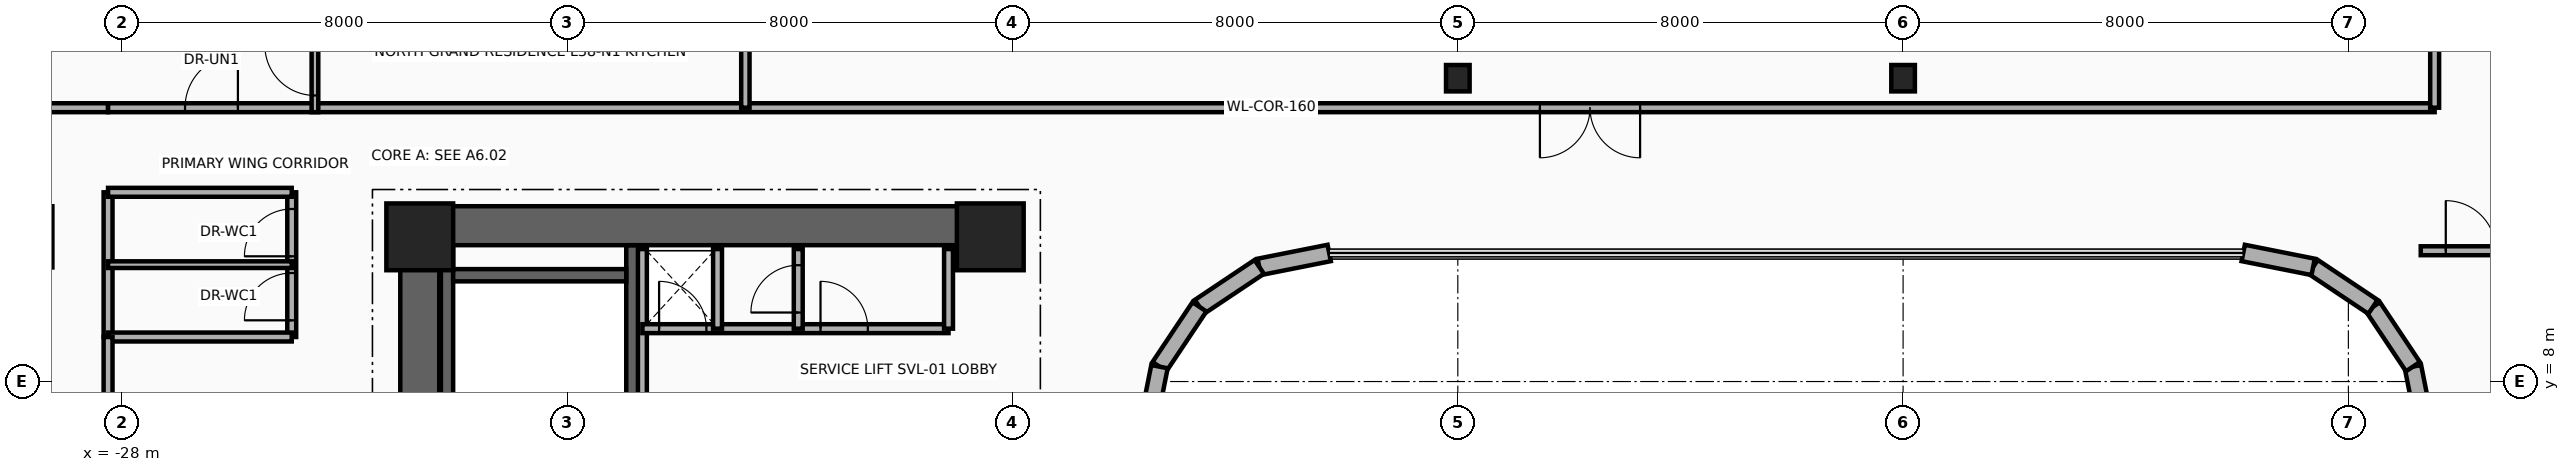
"""IFC4 building model, lengths in metres.
Left out: names, types, materials, properties, quantities, classifications, styles, units other than length and angle.
Written with IfcOpenShell. Run it as: python <this file> out.ifc"""

import sys

from ifc_helpers import new_model, si_unit, direction, frame, frame_2d, origin, origin_2d, place, context, subcontext, project, spatial, rectangle, i_section, extrude, source, transform, mapped, element, fill, save


model = new_model("IFC4")
c1 = context("Model", 3, precision=1e-05, world=origin(), true_north=direction((0.0, 1.0)))
c2 = subcontext(c1, "Body", "Model", "MODEL_VIEW")
j1 = project(units=[si_unit("LENGTHUNIT", "METRE"), si_unit("PLANEANGLEUNIT", "RADIAN")], contexts=[c1])
p1 = place(None, origin())
s1 = spatial("IfcSite", under=j1, at=p1, CompositionType="ELEMENT")
p2 = place(p1, origin())
s2 = spatial("IfcBuilding", under=s1, at=p2, CompositionType="ELEMENT")
p3 = place(p2, frame((0.0, 0.0, 150.1)))
s3 = spatial("IfcBuildingStorey", under=s2, at=p3, CompositionType="ELEMENT", Elevation=150.1)
for number, where, z_axis, x_axis in (
    (1, (-22.16, 1.78, 0.0), (0.0, 0.0, 1.0), (0.0, 1.0, 0.0)),
    (2, (-18.83, 1.78, 0.0), (0.0, 0.0, 1.0), (0.0, 1.0, 0.0)),
):
    element("IfcWall", number, at=place(p3, frame(where, z_axis=z_axis, x_axis=x_axis)), inside=s3, PredefinedType="SHEAR", context=c2, shape_type="SweptSolid", body=[
        extrude(rectangle(XDim=8.67, YDim=0.22, at=frame_2d((4.335, 0.0))), origin(), (0.0, 0.0, 1.0), 3.46),
    ])
p4 = place(p3, frame((-22.05, 9.91, 0.0), z_axis=(0.0, 0.0, 1.0), x_axis=(1.0, 0.0, 0.0)))
e3 = element("IfcWall", 3, at=p4, inside=s3, PredefinedType="SHEAR", context=c2, shape_type="SweptSolid", body=[
    extrude(rectangle(XDim=3.11, YDim=0.22, at=frame_2d((1.555, 0.0))), origin(), (0.0, 0.0, 1.0), 3.46),
])
p5 = place(p3, frame((-22.65, -11.15, 0.0), z_axis=(0.0, 0.0, 1.0), x_axis=(0.0, 1.0, 0.0)))
e4 = element("IfcWall", 4, at=p5, inside=s3, PredefinedType="SHEAR", context=c2, shape_type="SweptSolid", body=[
    extrude(rectangle(XDim=22.3, YDim=0.7, at=frame_2d((11.15, 0.0))), origin(), (0.0, 0.0, 1.0), 3.46),
])
p6 = place(p3, frame((-22.65, 10.8, 0.0), z_axis=(0.0, 0.0, 1.0), x_axis=(1.0, 0.0, 0.0)))
e5 = element("IfcWall", 5, at=p6, inside=s3, PredefinedType="SHEAR", context=c2, shape_type="SweptSolid", body=[
    extrude(rectangle(XDim=10.25, YDim=0.7, at=frame_2d((5.125, 0.0))), origin(), (0.0, 0.0, 1.0), 3.46),
])
m1 = source(origin(), c2, "Body", "SweptSolid", [
    extrude(rectangle(XDim=1.2, YDim=1.2, at=origin_2d()), origin(), (0.0, 0.0, 1.0), 3.7),
])
for number, where, z_axis, x_axis in (
    (6, (-22.65, 10.6, 0.0), (0.0, 0.0, 1.0), (1.0, 0.0, 0.0)),
    (7, (-12.4, 10.6, 0.0), (0.0, 0.0, 1.0), (1.0, 0.0, 0.0)),
):
    element("IfcColumn", number, at=place(p3, frame(where, z_axis=z_axis, x_axis=x_axis)), inside=s3, PredefinedType="COLUMN", context=c2, shape_type="MappedRepresentation", body=[
        mapped(m1, transform((0.0, 0.0, 0.0), x_axis=(1.0, 0.0, 0.0), y_axis=(0.0, 1.0, 0.0), z_axis=(0.0, 0.0, 1.0), scale=1.0)),
    ])
m2 = source(origin(), c2, "Body", "SweptSolid", [
    extrude(i_section(OverallWidth=0.424, OverallDepth=0.474, WebThickness=0.048, FlangeThickness=0.077, at=origin_2d()), origin(), (0.0, 0.0, 1.0), 3.7),
])
for number, where, z_axis, x_axis in (
    (8, (-4.0, 13.45, 0.0), (0.0, 0.0, 1.0), (1.0, 0.0, 0.0)),
    (9, (4.0, 13.45, 0.0), (0.0, 0.0, 1.0), (1.0, 0.0, 0.0)),
):
    element("IfcColumn", number, at=place(p3, frame(where, z_axis=z_axis, x_axis=x_axis)), inside=s3, PredefinedType="COLUMN", context=c2, shape_type="MappedRepresentation", body=[
        mapped(m2, transform((0.0, 0.0, 0.0), x_axis=(1.0, 0.0, 0.0), y_axis=(0.0, 1.0, 0.0), z_axis=(0.0, 0.0, 1.0), scale=1.0)),
    ])
p7 = place(p3, frame((13.41, 7.011, 0.0), z_axis=(0.0, 0.0, 1.0), x_axis=(-0.195090163074, 0.980785312019, 0.0)))
e10 = element("IfcWall", 10, at=p7, inside=s3, PredefinedType="SOLIDWALL", context=c2, shape_type="SweptSolid", body=[
    extrude(rectangle(XDim=1.281, YDim=0.3, at=frame_2d((0.641, 0.0))), origin(), (0.0, 0.0, 1.0), 3.46),
])
for number, where, z_axis, x_axis in (
    (11, (13.16, 8.268, 0.0), (0.0, 0.0, 1.0), (-0.556, 0.831, 0.0)),
    (12, (12.442, 9.342, 0.0), (0.0, 0.0, 1.0), (-0.831, 0.556, 0.0)),
):
    element("IfcWall", number, at=place(p3, frame(where, z_axis=z_axis, x_axis=x_axis)), inside=s3, PredefinedType="SOLIDWALL", context=c2, shape_type="SweptSolid", body=[
        extrude(rectangle(XDim=1.292, YDim=0.3, at=frame_2d((0.646, 0.0))), origin(), (0.0, 0.0, 1.0), 3.46),
    ])
for number, where, z_axis, x_axis in (
    (13, (11.367, 10.06, 0.0), (0.0, 0.0, 1.0), (-0.981, 0.195, 0.0)),
    (14, (-6.311, 10.31, 0.0), (0.0, 0.0, 1.0), (-0.981, -0.195, 0.0)),
):
    element("IfcWall", number, at=place(p3, frame(where, z_axis=z_axis, x_axis=x_axis)), inside=s3, PredefinedType="SOLIDWALL", context=c2, shape_type="SweptSolid", body=[
        extrude(rectangle(XDim=1.281, YDim=0.3, at=frame_2d((0.641, 0.0))), origin(), (0.0, 0.0, 1.0), 3.46),
    ])
p8 = place(p3, frame((-7.567, 10.06, 0.0), z_axis=(0.0, 0.0, 1.0), x_axis=(-0.831497739511, -0.555528135371, 0.0)))
e15 = element("IfcWall", 15, at=p8, inside=s3, PredefinedType="SOLIDWALL", context=c2, shape_type="SweptSolid", body=[
    extrude(rectangle(XDim=1.292, YDim=0.3, at=frame_2d((0.646, 0.0))), origin(), (0.0, 0.0, 1.0), 3.46),
])
p9 = place(p3, frame((-8.642, 9.342, 0.0), z_axis=(0.0, 0.0, 1.0), x_axis=(-0.555615398575, -0.831439431869, 0.0)))
e16 = element("IfcWall", 16, at=p9, inside=s3, PredefinedType="SOLIDWALL", context=c2, shape_type="SweptSolid", body=[
    extrude(rectangle(XDim=1.292, YDim=0.3, at=frame_2d((0.646, 0.0))), origin(), (0.0, 0.0, 1.0), 3.46),
])
p10 = place(p3, frame((-9.36, 8.268, 0.0), z_axis=(0.0, 0.0, 1.0), x_axis=(-0.195090163074, -0.980785312019, 0.0)))
e17 = element("IfcWall", 17, at=p10, inside=s3, PredefinedType="SOLIDWALL", context=c2, shape_type="SweptSolid", body=[
    extrude(rectangle(XDim=1.281, YDim=0.3, at=frame_2d((0.641, 0.0))), origin(), (0.0, 0.0, 1.0), 3.46),
])
p11 = place(p3, frame((-18.65, 7.45, 0.0), z_axis=(0.0, 0.0, 1.0), x_axis=(0.0, 1.0, 0.0)))
e18 = element("IfcWall", 18, at=p11, inside=s3, PredefinedType="PARTITIONING", context=c2, shape_type="SweptSolid", body=[
    extrude(rectangle(XDim=2.93, YDim=0.16, at=frame_2d((1.465, 0.0))), origin(), (0.0, 0.0, 1.0), 3.46),
])
p12 = place(p3, frame((-18.65, 8.95, 0.0), z_axis=(0.0, 0.0, 1.0), x_axis=(1.0, 0.0, 0.0)))
e19 = element("IfcWall", 19, at=p12, inside=s3, PredefinedType="PARTITIONING", context=c2, shape_type="SweptSolid", body=[
    extrude(rectangle(XDim=5.5, YDim=0.16, at=frame_2d((2.75, 0.0))), origin(), (0.0, 0.0, 1.0), 3.46),
])
p13 = place(p12, frame((0.3, 0.0, 0.0)))
e20 = element("IfcOpeningElement", 20, at=p13, cuts=e19, PredefinedType="OPENING", context=c2, shape_type="SweptSolid", body=[
    extrude(rectangle(XDim=0.85, YDim=2.05, at=frame_2d((0.425, 1.025))), frame((0.0, 0.095, 0.0), z_axis=(0.0, -1.0, 0.0), x_axis=(1.0, 0.0, 0.0)), (0.0, 0.0, 1.0), 0.19),
])
p14 = place(p12, frame((3.2, 0.0, 0.0)))
e21 = element("IfcOpeningElement", 21, at=p14, cuts=e19, PredefinedType="OPENING", context=c2, shape_type="SweptSolid", body=[
    extrude(rectangle(XDim=0.85, YDim=2.05, at=frame_2d((0.425, 1.025))), frame((0.0, 0.095, 0.0), z_axis=(0.0, -1.0, 0.0), x_axis=(1.0, 0.0, 0.0)), (0.0, 0.0, 1.0), 0.19),
])
for number, where, z_axis, x_axis in (
    (22, (-13.15, 8.95, 0.0), (0.0, 0.0, 1.0), (0.0, 1.0, 0.0)),
    (23, (-17.3, 8.95, 0.0), (0.0, 0.0, 1.0), (0.0, 1.0, 0.0)),
):
    element("IfcWall", number, at=place(p3, frame(where, z_axis=z_axis, x_axis=x_axis)), inside=s3, PredefinedType="PARTITIONING", context=c2, shape_type="SweptSolid", body=[
        extrude(rectangle(XDim=1.43, YDim=0.16, at=frame_2d((0.715, 0.0))), origin(), (0.0, 0.0, 1.0), 3.46),
    ])
p15 = place(p3, frame((-15.85, 8.95, 0.0), z_axis=(0.0, 0.0, 1.0), x_axis=(0.0, 1.0, 0.0)))
e24 = element("IfcWall", 24, at=p15, inside=s3, PredefinedType="PARTITIONING", context=c2, shape_type="SweptSolid", body=[
    extrude(rectangle(XDim=1.43, YDim=0.16, at=frame_2d((0.715, 0.0))), origin(), (0.0, 0.0, 1.0), 3.46),
])
p16 = place(p15, frame((0.29, 0.0, 0.0)))
e25 = element("IfcOpeningElement", 25, at=p16, cuts=e24, PredefinedType="OPENING", context=c2, shape_type="SweptSolid", body=[
    extrude(rectangle(XDim=0.85, YDim=2.05, at=frame_2d((0.425, 1.025))), frame((0.0, 0.095, 0.0), z_axis=(0.0, -1.0, 0.0), x_axis=(1.0, 0.0, 0.0)), (0.0, 0.0, 1.0), 0.19),
])
p17 = place(p3, frame((-28.25, 8.8, 0.0), z_axis=(0.0, 0.0, 1.0), x_axis=(0.0, 1.0, 0.0)))
e26 = element("IfcWall", 26, at=p17, inside=s3, PredefinedType="PARTITIONING", context=c2, shape_type="SweptSolid", body=[
    extrude(rectangle(XDim=2.6, YDim=0.16, at=frame_2d((1.3, 0.0))), origin(), (0.0, 0.0, 1.0), 2.666),
])
p18 = place(p3, frame((-24.95, 8.8, 0.0), z_axis=(0.0, 0.0, 1.0), x_axis=(0.0, 1.0, 0.0)))
e27 = element("IfcWall", 27, at=p18, inside=s3, PredefinedType="PARTITIONING", context=c2, shape_type="SweptSolid", body=[
    extrude(rectangle(XDim=2.6, YDim=0.16, at=frame_2d((1.3, 0.0))), origin(), (0.0, 0.0, 1.0), 2.666),
])
p19 = place(p18, frame((0.3, 0.0, 0.0)))
e28 = element("IfcOpeningElement", 28, at=p19, cuts=e27, PredefinedType="OPENING", context=c2, shape_type="SweptSolid", body=[
    extrude(rectangle(XDim=0.85, YDim=2.1, at=frame_2d((0.425, 1.05))), frame((0.0, 0.095, 0.0), z_axis=(0.0, -1.0, 0.0), x_axis=(1.0, 0.0, 0.0)), (0.0, 0.0, 1.0), 0.19),
])
p20 = place(p18, frame((1.45, 0.0, 0.0)))
e29 = element("IfcOpeningElement", 29, at=p20, cuts=e27, PredefinedType="OPENING", context=c2, shape_type="SweptSolid", body=[
    extrude(rectangle(XDim=0.85, YDim=2.1, at=frame_2d((0.425, 1.05))), frame((0.0, 0.095, 0.0), z_axis=(0.0, -1.0, 0.0), x_axis=(1.0, 0.0, 0.0)), (0.0, 0.0, 1.0), 0.19),
])
for number, where, z_axis, x_axis in (
    (30, (-28.25, 8.8, 0.0), (0.0, 0.0, 1.0), (1.0, 0.0, 0.0)),
    (31, (-28.25, 11.4, 0.0), (0.0, 0.0, 1.0), (1.0, 0.0, 0.0)),
):
    element("IfcWall", number, at=place(p3, frame(where, z_axis=z_axis, x_axis=x_axis)), inside=s3, PredefinedType="PARTITIONING", context=c2, shape_type="SweptSolid", body=[
        extrude(rectangle(XDim=3.3, YDim=0.16, at=frame_2d((1.65, 0.0))), origin(), (0.0, 0.0, 1.0), 3.46),
    ])
p21 = place(p3, frame((-28.25, 10.1, 0.0), z_axis=(0.0, 0.0, 1.0), x_axis=(1.0, 0.0, 0.0)))
e32 = element("IfcWall", 32, at=p21, inside=s3, PredefinedType="PARTITIONING", context=c2, shape_type="SweptSolid", body=[
    extrude(rectangle(XDim=3.3, YDim=0.12, at=frame_2d((1.65, 0.0))), origin(), (0.0, 0.0, 1.0), 3.46),
])
p22 = place(p3, frame((-28.25, 6.2, 0.0), z_axis=(0.0, 0.0, 1.0), x_axis=(0.0, 1.0, 0.0)))
e33 = element("IfcWall", 33, at=p22, inside=s3, PredefinedType="PARTITIONING", context=c2, shape_type="SweptSolid", body=[
    extrude(rectangle(XDim=2.6, YDim=0.16, at=frame_2d((1.3, 0.0))), origin(), (0.0, 0.0, 1.0), 2.988),
])
p23 = place(p3, frame((-32.54, 12.92, 0.0), z_axis=(0.0, 0.0, 1.0), x_axis=(1.0, 0.0, 0.0)))
e34 = element("IfcWall", 34, at=p23, inside=s3, PredefinedType="PARTITIONING", context=c2, shape_type="SweptSolid", body=[
    extrude(rectangle(XDim=4.29, YDim=0.16, at=frame_2d((2.145, 0.0))), origin(), (0.0, 0.0, 1.0), 2.896),
])
p24 = place(p3, frame((-28.25, 12.92, 0.0), z_axis=(0.0, 0.0, 1.0), x_axis=(1.0, 0.0, 0.0)))
e35 = element("IfcWall", 35, at=p24, inside=s3, PredefinedType="PARTITIONING", context=c2, shape_type="SweptSolid", body=[
    extrude(rectangle(XDim=41.8, YDim=0.16, at=frame_2d((20.9, 0.0))), origin(), (0.0, 0.0, 1.0), 2.666),
])
p25 = place(p24, frame((1.383, 0.0, 0.0)))
e36 = element("IfcOpeningElement", 36, at=p25, cuts=e35, PredefinedType="OPENING", context=c2, shape_type="SweptSolid", body=[
    extrude(rectangle(XDim=0.95, YDim=2.15, at=frame_2d((0.475, 1.075))), frame((0.0, 0.095, 0.0), z_axis=(0.0, -1.0, 0.0), x_axis=(1.0, 0.0, 0.0)), (0.0, 0.0, 1.0), 0.19),
])
p26 = place(p24, frame((25.725, 0.0, 0.0)))
e37 = element("IfcOpeningElement", 37, at=p26, cuts=e35, PredefinedType="OPENING", context=c2, shape_type="SweptSolid", body=[
    extrude(rectangle(XDim=1.8, YDim=2.15, at=frame_2d((0.9, 1.075))), frame((0.0, 0.095, 0.0), z_axis=(0.0, -1.0, 0.0), x_axis=(1.0, 0.0, 0.0)), (0.0, 0.0, 1.0), 0.19),
])
p27 = place(p3, frame((13.55, 12.92, 0.0), z_axis=(0.0, 0.0, 1.0), x_axis=(0.0, 1.0, 0.0)))
e38 = element("IfcWall", 38, at=p27, inside=s3, PredefinedType="PARTITIONING", context=c2, shape_type="SweptSolid", body=[
    extrude(rectangle(XDim=5.857, YDim=0.16, at=frame_2d((2.928, 0.0))), origin(), (0.0, 0.0, 1.0), 2.666),
])
p28 = place(p3, frame((-16.8, 12.92, 0.0), z_axis=(0.0, 0.0, 1.0), x_axis=(0.0, 1.0, 0.0)))
e39 = element("IfcWall", 39, at=p28, inside=s3, PredefinedType="PARTITIONING", context=c2, shape_type="SweptSolid", body=[
    extrude(rectangle(XDim=6.977, YDim=0.15, at=frame_2d((3.488, 0.0))), origin(), (0.0, 0.0, 1.0), 2.666),
])
p29 = place(p3, frame((-24.533, 12.84, 0.0), z_axis=(0.0, 0.0, 1.0), x_axis=(0.0, 1.0, 0.0)))
e40 = element("IfcWall", 40, at=p29, inside=s3, PredefinedType="PARTITIONING", context=c2, shape_type="SweptSolid", body=[
    extrude(rectangle(XDim=2.08, YDim=0.12, at=frame_2d((1.04, 0.0))), origin(), (0.0, 0.0, 1.0), 2.666),
])
p30 = place(p29, frame((0.3, 0.0, 0.0)))
e41 = element("IfcOpeningElement", 41, at=p30, cuts=e40, PredefinedType="OPENING", context=c2, shape_type="SweptSolid", body=[
    extrude(rectangle(XDim=0.9, YDim=2.1, at=frame_2d((0.45, 1.05))), frame((0.0, 0.075, 0.0), z_axis=(0.0, -1.0, 0.0), x_axis=(1.0, 0.0, 0.0)), (0.0, 0.0, 1.0), 0.15),
])
p31 = place(p3, frame((13.3, 10.35, 0.0), z_axis=(0.0, 0.0, 1.0), x_axis=(1.0, 0.0, 0.0)))
e42 = element("IfcWall", 42, at=p31, inside=s3, PredefinedType="PARTITIONING", context=c2, shape_type="SweptSolid", body=[
    extrude(rectangle(XDim=2.1, YDim=0.16, at=frame_2d((1.05, 0.0))), origin(), (0.0, 0.0, 1.0), 2.666),
])
p32 = place(p31, frame((0.45, 0.0, 0.0)))
e43 = element("IfcOpeningElement", 43, at=p32, cuts=e42, PredefinedType="OPENING", context=c2, shape_type="SweptSolid", body=[
    extrude(rectangle(XDim=0.9, YDim=2.1, at=frame_2d((0.45, 1.05))), frame((0.0, 0.095, 0.0), z_axis=(0.0, -1.0, 0.0), x_axis=(1.0, 0.0, 0.0)), (0.0, 0.0, 1.0), 0.19),
])
p33 = place(p13, origin())
e44 = element("IfcDoor", 44, at=p33, inside=s3, OperationType="SINGLE_SWING_LEFT", PredefinedType="DOOR", context=c2, shape_type="SweptSolid", body=[
    extrude(rectangle(XDim=0.85, YDim=2.05, at=frame_2d((0.425, 1.025))), frame((0.0, 0.025, 0.0), z_axis=(0.0, -1.0, 0.0), x_axis=(1.0, 0.0, 0.0)), (0.0, 0.0, 1.0), 0.05),
])
fill(e20, e44)
p34 = place(p14, origin())
e45 = element("IfcDoor", 45, at=p34, inside=s3, OperationType="SINGLE_SWING_RIGHT", PredefinedType="DOOR", context=c2, shape_type="SweptSolid", body=[
    extrude(rectangle(XDim=0.85, YDim=2.05, at=frame_2d((0.425, 1.025))), frame((0.0, 0.025, 0.0), z_axis=(0.0, -1.0, 0.0), x_axis=(1.0, 0.0, 0.0)), (0.0, 0.0, 1.0), 0.05),
])
fill(e21, e45)
p35 = place(p16, origin())
e46 = element("IfcDoor", 46, at=p35, inside=s3, OperationType="SINGLE_SWING_LEFT", PredefinedType="DOOR", context=c2, shape_type="SweptSolid", body=[
    extrude(rectangle(XDim=0.85, YDim=2.05, at=frame_2d((0.425, 1.025))), frame((0.0, 0.025, 0.0), z_axis=(0.0, -1.0, 0.0), x_axis=(1.0, 0.0, 0.0)), (0.0, 0.0, 1.0), 0.05),
])
fill(e25, e46)
p36 = place(p19, origin())
e47 = element("IfcDoor", 47, at=p36, inside=s3, OperationType="SINGLE_SWING_LEFT", PredefinedType="DOOR", context=c2, shape_type="SweptSolid", body=[
    extrude(rectangle(XDim=0.85, YDim=2.1, at=frame_2d((0.425, 1.05))), frame((0.0, 0.025, 0.0), z_axis=(0.0, -1.0, 0.0), x_axis=(1.0, 0.0, 0.0)), (0.0, 0.0, 1.0), 0.05),
])
fill(e28, e47)
p37 = place(p20, origin())
e48 = element("IfcDoor", 48, at=p37, inside=s3, OperationType="SINGLE_SWING_RIGHT", PredefinedType="DOOR", context=c2, shape_type="SweptSolid", body=[
    extrude(rectangle(XDim=0.85, YDim=2.1, at=frame_2d((0.425, 1.05))), frame((0.0, 0.025, 0.0), z_axis=(0.0, -1.0, 0.0), x_axis=(1.0, 0.0, 0.0)), (0.0, 0.0, 1.0), 0.05),
])
fill(e29, e48)
p38 = place(p25, origin())
e49 = element("IfcDoor", 49, at=p38, inside=s3, OperationType="SINGLE_SWING_RIGHT", PredefinedType="DOOR", context=c2, shape_type="SweptSolid", body=[
    extrude(rectangle(XDim=0.95, YDim=2.15, at=frame_2d((0.475, 1.075))), frame((0.0, 0.025, 0.0), z_axis=(0.0, -1.0, 0.0), x_axis=(1.0, 0.0, 0.0)), (0.0, 0.0, 1.0), 0.05),
])
fill(e36, e49)
p39 = place(p30, origin())
e50 = element("IfcDoor", 50, at=p39, inside=s3, OperationType="SINGLE_SWING_RIGHT", PredefinedType="DOOR", context=c2, shape_type="SweptSolid", body=[
    extrude(rectangle(XDim=0.9, YDim=2.1, at=frame_2d((0.45, 1.05))), frame((0.0, 0.025, 0.0), z_axis=(0.0, -1.0, 0.0), x_axis=(1.0, 0.0, 0.0)), (0.0, 0.0, 1.0), 0.05),
])
fill(e41, e50)
p40 = place(p26, frame((1.8, 0.0, 0.0), z_axis=(0.0, 0.0, 1.0), x_axis=(-1.0, 0.0, 0.0)))
e51 = element("IfcDoor", 51, at=p40, inside=s3, OperationType="DOUBLE_DOOR_SINGLE_SWING", PredefinedType="DOOR", context=c2, shape_type="SweptSolid", body=[
    extrude(rectangle(XDim=1.8, YDim=2.15, at=frame_2d((0.9, 1.075))), frame((0.0, 0.025, 0.0), z_axis=(0.0, -1.0, 0.0), x_axis=(1.0, 0.0, 0.0)), (0.0, 0.0, 1.0), 0.05),
])
fill(e37, e51)
p41 = place(p32, origin())
e52 = element("IfcDoor", 52, at=p41, inside=s3, OperationType="SINGLE_SWING_RIGHT", PredefinedType="DOOR", context=c2, shape_type="SweptSolid", body=[
    extrude(rectangle(XDim=0.9, YDim=2.1, at=frame_2d((0.45, 1.05))), frame((0.0, 0.025, 0.0), z_axis=(0.0, -1.0, 0.0), x_axis=(1.0, 0.0, 0.0)), (0.0, 0.0, 1.0), 0.05),
])
fill(e43, e52)
save(model, sys.argv[1])
